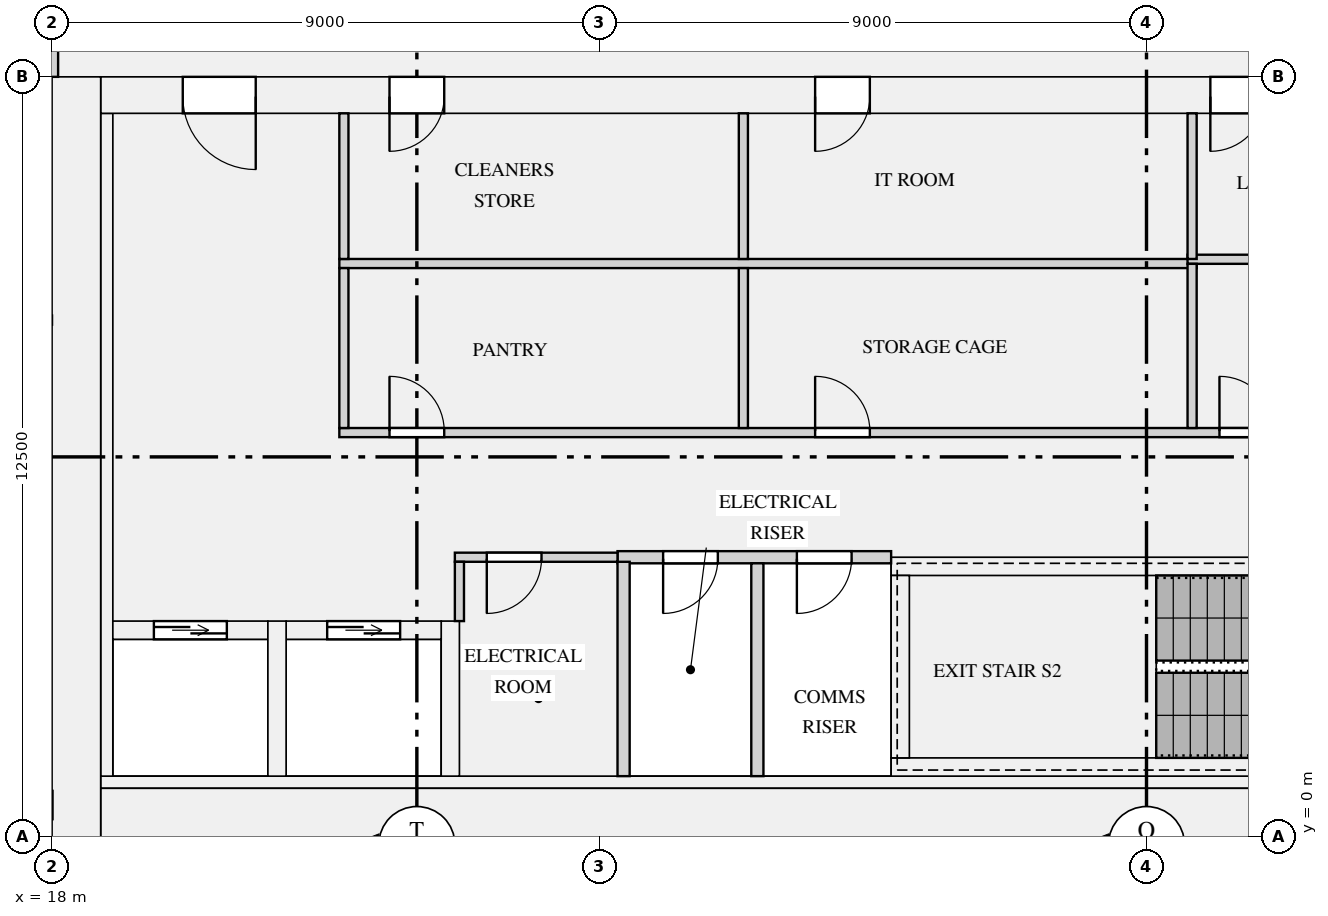
"""IFC4 building model, lengths in metres.
Left out: names, types, materials, properties, quantities, classifications, styles, units other than length and angle.
Written with IfcOpenShell. Run it as: python <this file> out.ifc"""

import sys

from ifc_helpers import new_model, si_unit, direction, frame, frame_2d, origin, place, context, subcontext, project, spatial, rectangle, extrude, element, fill, save


model = new_model("IFC4")
c1 = context("Model", 3, precision=1e-05, world=origin(), true_north=direction((0.0, 1.0)))
c2 = subcontext(c1, "Body", "Model", "MODEL_VIEW")
j1 = project(units=[si_unit("LENGTHUNIT", "METRE"), si_unit("PLANEANGLEUNIT", "RADIAN")], contexts=[c1])
p1 = place(None, origin())
s1 = spatial("IfcSite", under=j1, at=p1, CompositionType="ELEMENT")
p2 = place(p1, origin())
s2 = spatial("IfcBuilding", under=s1, at=p2, CompositionType="ELEMENT")
p3 = place(p2, frame((0.0, 0.0, 127.65)))
s3 = spatial("IfcBuildingStorey", under=s2, at=p3, CompositionType="ELEMENT", Elevation=127.65)
p4 = place(p3, frame((18.4, 0.0, 0.0), z_axis=(0.0, 0.0, 1.0), x_axis=(0.0, 1.0, 0.0)))
e1 = element("IfcWall", 1, at=p4, inside=s3, PredefinedType="SHEAR", context=c2, shape_type="SweptSolid", body=[
    extrude(rectangle(XDim=12.5, YDim=0.8, at=frame_2d((6.25, 0.0))), origin(), (0.0, 0.0, 1.0), 3.15),
])
p5 = place(p3, frame((18.8, 0.4, 0.0), z_axis=(0.0, 0.0, 1.0), x_axis=(1.0, 0.0, 0.0)))
e2 = element("IfcWall", 2, at=p5, inside=s3, PredefinedType="SHEAR", context=c2, shape_type="SweptSolid", body=[
    extrude(rectangle(XDim=34.4, YDim=0.8, at=frame_2d((17.2, 0.0))), origin(), (0.0, 0.0, 1.0), 3.15),
])
p6 = place(p3, frame((18.8, 12.2, 0.0), z_axis=(0.0, 0.0, 1.0), x_axis=(1.0, 0.0, 0.0)))
e3 = element("IfcWall", 3, at=p6, inside=s3, PredefinedType="SHEAR", context=c2, shape_type="SweptSolid", body=[
    extrude(rectangle(XDim=34.4, YDim=0.6, at=frame_2d((17.2, 0.0))), origin(), (0.0, 0.0, 1.0), 3.15),
])
p7 = place(p6, frame((24.375, 0.0, 0.0)))
e4 = element("IfcOpeningElement", 4, at=p7, cuts=e3, PredefinedType="OPENING", context=c2, shape_type="SweptSolid", body=[
    extrude(rectangle(XDim=1.1, YDim=2.1, at=frame_2d((0.55, 1.05))), frame((0.0, 0.31, 0.0), z_axis=(0.0, -1.0, 0.0), x_axis=(1.0, 0.0, 0.0)), (0.0, 0.0, 1.0), 0.62),
])
p8 = place(p6, frame((26.625, 0.0, 0.0)))
e5 = element("IfcOpeningElement", 5, at=p8, cuts=e3, PredefinedType="OPENING", context=c2, shape_type="SweptSolid", body=[
    extrude(rectangle(XDim=1.1, YDim=2.1, at=frame_2d((0.55, 1.05))), frame((0.0, 0.31, 0.0), z_axis=(0.0, -1.0, 0.0), x_axis=(1.0, 0.0, 0.0)), (0.0, 0.0, 1.0), 0.62),
])
p9 = place(p6, frame((28.875, 0.0, 0.0)))
e6 = element("IfcOpeningElement", 6, at=p9, cuts=e3, PredefinedType="OPENING", context=c2, shape_type="SweptSolid", body=[
    extrude(rectangle(XDim=1.1, YDim=2.1, at=frame_2d((0.55, 1.05))), frame((0.0, 0.31, 0.0), z_axis=(0.0, -1.0, 0.0), x_axis=(1.0, 0.0, 0.0)), (0.0, 0.0, 1.0), 0.62),
])
p10 = place(p6, frame((4.75, 0.0, 0.0)))
e7 = element("IfcOpeningElement", 7, at=p10, cuts=e3, PredefinedType="OPENING", context=c2, shape_type="SweptSolid", body=[
    extrude(rectangle(XDim=0.9, YDim=2.1, at=frame_2d((0.45, 1.05))), frame((0.0, 0.31, 0.0), z_axis=(0.0, -1.0, 0.0), x_axis=(1.0, 0.0, 0.0)), (0.0, 0.0, 1.0), 0.62),
])
p11 = place(p6, frame((11.75, 0.0, 0.0)))
e8 = element("IfcOpeningElement", 8, at=p11, cuts=e3, PredefinedType="OPENING", context=c2, shape_type="SweptSolid", body=[
    extrude(rectangle(XDim=0.9, YDim=2.1, at=frame_2d((0.45, 1.05))), frame((0.0, 0.31, 0.0), z_axis=(0.0, -1.0, 0.0), x_axis=(1.0, 0.0, 0.0)), (0.0, 0.0, 1.0), 0.62),
])
p12 = place(p6, frame((18.25, 0.0, 0.0)))
e9 = element("IfcOpeningElement", 9, at=p12, cuts=e3, PredefinedType="OPENING", context=c2, shape_type="SweptSolid", body=[
    extrude(rectangle(XDim=0.9, YDim=2.1, at=frame_2d((0.45, 1.05))), frame((0.0, 0.31, 0.0), z_axis=(0.0, -1.0, 0.0), x_axis=(1.0, 0.0, 0.0)), (0.0, 0.0, 1.0), 0.62),
])
p13 = place(p6, frame((1.35, 0.0, 0.0)))
e10 = element("IfcOpeningElement", 10, at=p13, cuts=e3, PredefinedType="OPENING", context=c2, shape_type="SweptSolid", body=[
    extrude(rectangle(XDim=1.2, YDim=2.1, at=frame_2d((0.6, 1.05))), frame((0.0, 0.31, 0.0), z_axis=(0.0, -1.0, 0.0), x_axis=(1.0, 0.0, 0.0)), (0.0, 0.0, 1.0), 0.62),
])
p14 = place(p6, frame((31.85, 0.0, 0.0)))
e11 = element("IfcOpeningElement", 11, at=p14, cuts=e3, PredefinedType="OPENING", context=c2, shape_type="SweptSolid", body=[
    extrude(rectangle(XDim=1.2, YDim=2.1, at=frame_2d((0.6, 1.05))), frame((0.0, 0.31, 0.0), z_axis=(0.0, -1.0, 0.0), x_axis=(1.0, 0.0, 0.0)), (0.0, 0.0, 1.0), 0.62),
])
p15 = place(p3, frame((18.9, 1.0, 0.0), z_axis=(0.0, 0.0, 1.0), x_axis=(0.0, 1.0, 0.0)))
e12 = element("IfcWall", 12, at=p15, inside=s3, PredefinedType="SHEAR", context=c2, shape_type="SweptSolid", body=[
    extrude(rectangle(XDim=10.9, YDim=0.2, at=frame_2d((5.45, 0.0))), origin(), (0.0, 0.0, 1.0), 3.15),
])
p16 = place(p3, frame((18.8, 0.9, 0.0), z_axis=(0.0, 0.0, 1.0), x_axis=(1.0, 0.0, 0.0)))
e13 = element("IfcWall", 13, at=p16, inside=s3, PredefinedType="SHEAR", context=c2, shape_type="SweptSolid", body=[
    extrude(rectangle(XDim=34.4, YDim=0.2, at=frame_2d((17.2, 0.0))), origin(), (0.0, 0.0, 1.0), 3.15),
])
p17 = place(p3, frame((19.0, 3.4, 0.0), z_axis=(0.0, 0.0, 1.0), x_axis=(1.0, 0.0, 0.0)))
e14 = element("IfcWall", 14, at=p17, inside=s3, PredefinedType="SHEAR", context=c2, shape_type="SweptSolid", body=[
    extrude(rectangle(XDim=2.55, YDim=0.3, at=frame_2d((1.275, 0.0))), origin(), (0.0, 0.0, 1.0), 3.15),
])
p18 = place(p17, frame((0.675, 0.0, 0.0)))
e15 = element("IfcOpeningElement", 15, at=p18, cuts=e14, PredefinedType="OPENING", context=c2, shape_type="SweptSolid", body=[
    extrude(rectangle(XDim=1.2, YDim=2.1, at=frame_2d((0.6, 1.05))), frame((0.0, 0.16, 0.0), z_axis=(0.0, -1.0, 0.0), x_axis=(1.0, 0.0, 0.0)), (0.0, 0.0, 1.0), 0.32),
])
p19 = place(p3, frame((21.85, 3.4, 0.0), z_axis=(0.0, 0.0, 1.0), x_axis=(1.0, 0.0, 0.0)))
e16 = element("IfcWall", 16, at=p19, inside=s3, PredefinedType="SHEAR", context=c2, shape_type="SweptSolid", body=[
    extrude(rectangle(XDim=2.55, YDim=0.3, at=frame_2d((1.275, 0.0))), origin(), (0.0, 0.0, 1.0), 3.15),
])
p20 = place(p19, frame((0.675, 0.0, 0.0)))
e17 = element("IfcOpeningElement", 17, at=p20, cuts=e16, PredefinedType="OPENING", context=c2, shape_type="SweptSolid", body=[
    extrude(rectangle(XDim=1.2, YDim=2.1, at=frame_2d((0.6, 1.05))), frame((0.0, 0.16, 0.0), z_axis=(0.0, -1.0, 0.0), x_axis=(1.0, 0.0, 0.0)), (0.0, 0.0, 1.0), 0.32),
])
for number, where, z_axis, x_axis in (
    (18, (21.7, 1.0, 0.0), (0.0, 0.0, 1.0), (0.0, 1.0, 0.0)),
    (19, (24.55, 1.0, 0.0), (0.0, 0.0, 1.0), (0.0, 1.0, 0.0)),
):
    element("IfcWall", number, at=place(p3, frame(where, z_axis=z_axis, x_axis=x_axis)), inside=s3, PredefinedType="SHEAR", context=c2, shape_type="SweptSolid", body=[
        extrude(rectangle(XDim=2.55, YDim=0.3, at=frame_2d((1.275, 0.0))), origin(), (0.0, 0.0, 1.0), 3.15),
    ])
p21 = place(p3, frame((31.8, 1.15, 0.0), z_axis=(0.0, 0.0, 1.0), x_axis=(1.0, 0.0, 0.0)))
e20 = element("IfcWall", 20, at=p21, inside=s3, PredefinedType="SHEAR", context=c2, shape_type="SweptSolid", body=[
    extrude(rectangle(XDim=8.4, YDim=0.3, at=frame_2d((4.2, 0.0))), origin(), (0.0, 0.0, 1.0), 3.15),
])
p22 = place(p3, frame((31.8, 4.45, 0.0), z_axis=(0.0, 0.0, 1.0), x_axis=(1.0, 0.0, 0.0)))
e21 = element("IfcWall", 21, at=p22, inside=s3, PredefinedType="SHEAR", context=c2, shape_type="SweptSolid", body=[
    extrude(rectangle(XDim=8.4, YDim=0.3, at=frame_2d((4.2, 0.0))), origin(), (0.0, 0.0, 1.0), 3.15),
])
p23 = place(p22, frame((6.8, 0.0, 0.0)))
e22 = element("IfcOpeningElement", 22, at=p23, cuts=e21, PredefinedType="OPENING", context=c2, shape_type="SweptSolid", body=[
    extrude(rectangle(XDim=1.1, YDim=2.1, at=frame_2d((0.55, 1.05))), frame((0.0, 0.16, 0.0), z_axis=(0.0, -1.0, 0.0), x_axis=(1.0, 0.0, 0.0)), (0.0, 0.0, 1.0), 0.32),
])
p24 = place(p3, frame((31.95, 1.3, 0.0), z_axis=(0.0, 0.0, 1.0), x_axis=(0.0, 1.0, 0.0)))
e23 = element("IfcWall", 23, at=p24, inside=s3, PredefinedType="SHEAR", context=c2, shape_type="SweptSolid", body=[
    extrude(rectangle(XDim=3.0, YDim=0.3, at=frame_2d((1.5, 0.0))), origin(), (0.0, 0.0, 1.0), 3.15),
])
p25 = place(p3, frame((14.05, 0.525, 0.9), z_axis=(0.0, 0.0, 1.0), x_axis=(1.0, 0.0, 0.0)))
e24 = element("IfcWall", 24, at=p25, inside=s3, PredefinedType="SOLIDWALL", context=c2, shape_type="SweptSolid", body=[
    extrude(rectangle(XDim=3.95, YDim=0.45, at=frame_2d((1.975, 0.0))), origin(), (0.0, 0.0, 1.0), 1.75),
])
p26 = place(p25, frame((1.225, 0.0, 0.15)))
e25 = element("IfcOpeningElement", 25, at=p26, cuts=e24, PredefinedType="OPENING", context=c2, shape_type="SweptSolid", body=[
    extrude(rectangle(XDim=1.5, YDim=1.5, at=frame_2d((0.75, 0.75))), frame((0.0, 0.235, 0.0), z_axis=(0.0, -1.0, 0.0), x_axis=(1.0, 0.0, 0.0)), (0.0, 0.0, 1.0), 0.47),
])
p27 = place(p3, frame((27.3, 4.6, 0.0), z_axis=(0.0, 0.0, 1.0), x_axis=(1.0, 0.0, 0.0)))
e26 = element("IfcWall", 26, at=p27, inside=s3, PredefinedType="PARTITIONING", context=c2, shape_type="SweptSolid", body=[
    extrude(rectangle(XDim=4.5, YDim=0.2, at=frame_2d((2.25, 0.0))), origin(), (0.0, 0.0, 1.0), 2.65),
])
p28 = place(p27, frame((0.75, 0.0, 0.0)))
e27 = element("IfcOpeningElement", 27, at=p28, cuts=e26, PredefinedType="OPENING", context=c2, shape_type="SweptSolid", body=[
    extrude(rectangle(XDim=0.9, YDim=2.1, at=frame_2d((0.45, 1.05))), frame((0.0, 0.11, 0.0), z_axis=(0.0, -1.0, 0.0), x_axis=(1.0, 0.0, 0.0)), (0.0, 0.0, 1.0), 0.22),
])
p29 = place(p27, frame((2.95, 0.0, 0.0)))
e28 = element("IfcOpeningElement", 28, at=p29, cuts=e26, PredefinedType="OPENING", context=c2, shape_type="SweptSolid", body=[
    extrude(rectangle(XDim=0.9, YDim=2.1, at=frame_2d((0.45, 1.05))), frame((0.0, 0.11, 0.0), z_axis=(0.0, -1.0, 0.0), x_axis=(1.0, 0.0, 0.0)), (0.0, 0.0, 1.0), 0.22),
])
p30 = place(p3, frame((24.625, 4.6, 0.0), z_axis=(0.0, 0.0, 1.0), x_axis=(1.0, 0.0, 0.0)))
e29 = element("IfcWall", 29, at=p30, inside=s3, PredefinedType="PARTITIONING", context=c2, shape_type="SweptSolid", body=[
    extrude(rectangle(XDim=2.675, YDim=0.15, at=frame_2d((1.337, 0.0))), origin(), (0.0, 0.0, 1.0), 2.65),
])
p31 = place(p30, frame((0.525, 0.0, 0.0)))
e30 = element("IfcOpeningElement", 30, at=p31, cuts=e29, PredefinedType="OPENING", context=c2, shape_type="SweptSolid", body=[
    extrude(rectangle(XDim=0.9, YDim=2.1, at=frame_2d((0.45, 1.05))), frame((0.0, 0.085, 0.0), z_axis=(0.0, -1.0, 0.0), x_axis=(1.0, 0.0, 0.0)), (0.0, 0.0, 1.0), 0.17),
])
p32 = place(p3, frame((22.725, 6.65, 0.0), z_axis=(0.0, 0.0, 1.0), x_axis=(1.0, 0.0, 0.0)))
e31 = element("IfcWall", 31, at=p32, inside=s3, PredefinedType="PARTITIONING", context=c2, shape_type="SweptSolid", body=[
    extrude(rectangle(XDim=19.8, YDim=0.15, at=frame_2d((9.9, 0.0))), origin(), (0.0, 0.0, 1.0), 2.65),
])
p33 = place(p32, frame((0.825, 0.0, 0.0)))
e32 = element("IfcOpeningElement", 32, at=p33, cuts=e31, PredefinedType="OPENING", context=c2, shape_type="SweptSolid", body=[
    extrude(rectangle(XDim=0.9, YDim=2.1, at=frame_2d((0.45, 1.05))), frame((0.0, 0.085, 0.0), z_axis=(0.0, -1.0, 0.0), x_axis=(1.0, 0.0, 0.0)), (0.0, 0.0, 1.0), 0.17),
])
p34 = place(p32, frame((7.825, 0.0, 0.0)))
e33 = element("IfcOpeningElement", 33, at=p34, cuts=e31, PredefinedType="OPENING", context=c2, shape_type="SweptSolid", body=[
    extrude(rectangle(XDim=0.9, YDim=2.1, at=frame_2d((0.45, 1.05))), frame((0.0, 0.085, 0.0), z_axis=(0.0, -1.0, 0.0), x_axis=(1.0, 0.0, 0.0)), (0.0, 0.0, 1.0), 0.17),
])
p35 = place(p32, frame((14.475, 0.0, 0.0)))
e34 = element("IfcOpeningElement", 34, at=p35, cuts=e31, PredefinedType="OPENING", context=c2, shape_type="SweptSolid", body=[
    extrude(rectangle(XDim=0.9, YDim=2.1, at=frame_2d((0.45, 1.05))), frame((0.0, 0.085, 0.0), z_axis=(0.0, -1.0, 0.0), x_axis=(1.0, 0.0, 0.0)), (0.0, 0.0, 1.0), 0.17),
])
p36 = place(p3, frame((22.725, 9.43, 0.0), z_axis=(0.0, 0.0, 1.0), x_axis=(1.0, 0.0, 0.0)))
e35 = element("IfcWall", 35, at=p36, inside=s3, PredefinedType="PARTITIONING", context=c2, shape_type="SweptSolid", body=[
    extrude(rectangle(XDim=14.1, YDim=0.15, at=frame_2d((7.05, 0.0))), origin(), (0.0, 0.0, 1.0), 2.65),
])
p37 = place(p3, frame((36.675, 9.5, 0.0), z_axis=(0.0, 0.0, 1.0), x_axis=(1.0, 0.0, 0.0)))
e36 = element("IfcWall", 36, at=p37, inside=s3, PredefinedType="PARTITIONING", context=c2, shape_type="SweptSolid", body=[
    extrude(rectangle(XDim=5.775, YDim=0.15, at=frame_2d((2.887, 0.0))), origin(), (0.0, 0.0, 1.0), 2.65),
])
p38 = place(p3, frame((27.4, 1.0, 0.0), z_axis=(0.0, 0.0, 1.0), x_axis=(0.0, 1.0, 0.0)))
e37 = element("IfcWall", 37, at=p38, inside=s3, PredefinedType="PARTITIONING", context=c2, shape_type="SweptSolid", body=[
    extrude(rectangle(XDim=3.525, YDim=0.2, at=frame_2d((1.762, 0.0))), origin(), (0.0, 0.0, 1.0), 2.65),
])
p39 = place(p3, frame((29.6, 1.0, 0.0), z_axis=(0.0, 0.0, 1.0), x_axis=(0.0, 1.0, 0.0)))
e38 = element("IfcWall", 38, at=p39, inside=s3, PredefinedType="PARTITIONING", context=c2, shape_type="SweptSolid", body=[
    extrude(rectangle(XDim=3.5, YDim=0.2, at=frame_2d((1.75, 0.0))), origin(), (0.0, 0.0, 1.0), 2.65),
])
p40 = place(p3, frame((24.7, 3.55, 0.0), z_axis=(0.0, 0.0, 1.0), x_axis=(0.0, 1.0, 0.0)))
e39 = element("IfcWall", 39, at=p40, inside=s3, PredefinedType="PARTITIONING", context=c2, shape_type="SweptSolid", body=[
    extrude(rectangle(XDim=0.975, YDim=0.15, at=frame_2d((0.487, 0.0))), origin(), (0.0, 0.0, 1.0), 2.65),
])
for number, where, z_axis, x_axis in (
    (40, (22.8, 6.725, 0.0), (0.0, 0.0, 1.0), (0.0, 1.0, 0.0)),
    (41, (29.37, 6.725, 0.0), (0.0, 0.0, 1.0), (0.0, 1.0, 0.0)),
):
    element("IfcWall", number, at=place(p3, frame(where, z_axis=z_axis, x_axis=x_axis)), inside=s3, PredefinedType="PARTITIONING", context=c2, shape_type="SweptSolid", body=[
        extrude(rectangle(XDim=2.63, YDim=0.15, at=frame_2d((1.315, 0.0))), origin(), (0.0, 0.0, 1.0), 2.65),
    ])
p41 = place(p3, frame((36.75, 6.725, 0.0), z_axis=(0.0, 0.0, 1.0), x_axis=(0.0, 1.0, 0.0)))
e42 = element("IfcWall", 42, at=p41, inside=s3, PredefinedType="PARTITIONING", context=c2, shape_type="SweptSolid", body=[
    extrude(rectangle(XDim=2.7, YDim=0.15, at=frame_2d((1.35, 0.0))), origin(), (0.0, 0.0, 1.0), 2.65),
])
for number, where, z_axis, x_axis in (
    (43, (22.8, 9.505, 0.0), (0.0, 0.0, 1.0), (0.0, 1.0, 0.0)),
    (44, (29.37, 9.505, 0.0), (0.0, 0.0, 1.0), (0.0, 1.0, 0.0)),
    (45, (36.75, 9.505, 0.0), (0.0, 0.0, 1.0), (0.0, 1.0, 0.0)),
):
    element("IfcWall", number, at=place(p3, frame(where, z_axis=z_axis, x_axis=x_axis)), inside=s3, PredefinedType="PARTITIONING", context=c2, shape_type="SweptSolid", body=[
        extrude(rectangle(XDim=2.395, YDim=0.15, at=frame_2d((1.198, 0.0))), origin(), (0.0, 0.0, 1.0), 2.65),
    ])
p42 = place(p3, frame((18.0, 12.5, 0.0), z_axis=(0.0, 0.0, 1.0), x_axis=(0.0, 1.0, 0.0)))
e46 = element("IfcWall", 46, at=p42, inside=s3, PredefinedType="PARTITIONING", context=c2, shape_type="SweptSolid", body=[
    extrude(rectangle(XDim=3.4, YDim=0.2, at=frame_2d((1.7, 0.0))), origin(), (0.0, 0.0, 1.0), 2.65),
])
p43 = place(p18, origin())
e47 = element("IfcDoor", 47, at=p43, inside=s3, OperationType="DOUBLE_DOOR_SLIDING", PredefinedType="DOOR", context=c2, shape_type="SweptSolid", body=[
    extrude(rectangle(XDim=1.2, YDim=2.1, at=frame_2d((0.6, 1.05))), frame((0.0, 0.025, 0.0), z_axis=(0.0, -1.0, 0.0), x_axis=(1.0, 0.0, 0.0)), (0.0, 0.0, 1.0), 0.05),
])
fill(e15, e47)
p44 = place(p20, origin())
e48 = element("IfcDoor", 48, at=p44, inside=s3, OperationType="DOUBLE_DOOR_SLIDING", PredefinedType="DOOR", context=c2, shape_type="SweptSolid", body=[
    extrude(rectangle(XDim=1.2, YDim=2.1, at=frame_2d((0.6, 1.05))), frame((0.0, 0.025, 0.0), z_axis=(0.0, -1.0, 0.0), x_axis=(1.0, 0.0, 0.0)), (0.0, 0.0, 1.0), 0.05),
])
fill(e17, e48)
p45 = place(p31, frame((0.9, 0.0, 0.0), z_axis=(0.0, 0.0, 1.0), x_axis=(-1.0, 0.0, 0.0)))
e49 = element("IfcDoor", 49, at=p45, inside=s3, OperationType="SINGLE_SWING_RIGHT", PredefinedType="DOOR", context=c2, shape_type="SweptSolid", body=[
    extrude(rectangle(XDim=0.9, YDim=2.1, at=frame_2d((0.45, 1.05))), frame((0.0, 0.025, 0.0), z_axis=(0.0, -1.0, 0.0), x_axis=(1.0, 0.0, 0.0)), (0.0, 0.0, 1.0), 0.05),
])
fill(e30, e49)
p46 = place(p33, origin())
e50 = element("IfcDoor", 50, at=p46, inside=s3, OperationType="SINGLE_SWING_LEFT", PredefinedType="DOOR", context=c2, shape_type="SweptSolid", body=[
    extrude(rectangle(XDim=0.9, YDim=2.1, at=frame_2d((0.45, 1.05))), frame((0.0, 0.025, 0.0), z_axis=(0.0, -1.0, 0.0), x_axis=(1.0, 0.0, 0.0)), (0.0, 0.0, 1.0), 0.05),
])
fill(e32, e50)
p47 = place(p34, origin())
e51 = element("IfcDoor", 51, at=p47, inside=s3, OperationType="SINGLE_SWING_LEFT", PredefinedType="DOOR", context=c2, shape_type="SweptSolid", body=[
    extrude(rectangle(XDim=0.9, YDim=2.1, at=frame_2d((0.45, 1.05))), frame((0.0, 0.025, 0.0), z_axis=(0.0, -1.0, 0.0), x_axis=(1.0, 0.0, 0.0)), (0.0, 0.0, 1.0), 0.05),
])
fill(e33, e51)
p48 = place(p10, frame((0.9, 0.0, 0.0), z_axis=(0.0, 0.0, 1.0), x_axis=(-1.0, 0.0, 0.0)))
e52 = element("IfcDoor", 52, at=p48, inside=s3, OperationType="SINGLE_SWING_RIGHT", PredefinedType="DOOR", context=c2, shape_type="SweptSolid", body=[
    extrude(rectangle(XDim=0.9, YDim=2.1, at=frame_2d((0.45, 1.05))), frame((0.0, 0.025, 0.0), z_axis=(0.0, -1.0, 0.0), x_axis=(1.0, 0.0, 0.0)), (0.0, 0.0, 1.0), 0.05),
])
fill(e7, e52)
p49 = place(p11, frame((0.9, 0.0, 0.0), z_axis=(0.0, 0.0, 1.0), x_axis=(-1.0, 0.0, 0.0)))
e53 = element("IfcDoor", 53, at=p49, inside=s3, OperationType="SINGLE_SWING_RIGHT", PredefinedType="DOOR", context=c2, shape_type="SweptSolid", body=[
    extrude(rectangle(XDim=0.9, YDim=2.1, at=frame_2d((0.45, 1.05))), frame((0.0, 0.025, 0.0), z_axis=(0.0, -1.0, 0.0), x_axis=(1.0, 0.0, 0.0)), (0.0, 0.0, 1.0), 0.05),
])
fill(e8, e53)
p50 = place(p35, origin())
e54 = element("IfcDoor", 54, at=p50, inside=s3, OperationType="SINGLE_SWING_LEFT", PredefinedType="DOOR", context=c2, shape_type="SweptSolid", body=[
    extrude(rectangle(XDim=0.9, YDim=2.1, at=frame_2d((0.45, 1.05))), frame((0.0, 0.025, 0.0), z_axis=(0.0, -1.0, 0.0), x_axis=(1.0, 0.0, 0.0)), (0.0, 0.0, 1.0), 0.05),
])
fill(e34, e54)
p51 = place(p12, frame((0.9, 0.0, 0.0), z_axis=(0.0, 0.0, 1.0), x_axis=(-1.0, 0.0, 0.0)))
e55 = element("IfcDoor", 55, at=p51, inside=s3, OperationType="SINGLE_SWING_RIGHT", PredefinedType="DOOR", context=c2, shape_type="SweptSolid", body=[
    extrude(rectangle(XDim=0.9, YDim=2.1, at=frame_2d((0.45, 1.05))), frame((0.0, 0.025, 0.0), z_axis=(0.0, -1.0, 0.0), x_axis=(1.0, 0.0, 0.0)), (0.0, 0.0, 1.0), 0.05),
])
fill(e9, e55)
p52 = place(p28, frame((0.9, 0.0, 0.0), z_axis=(0.0, 0.0, 1.0), x_axis=(-1.0, 0.0, 0.0)))
e56 = element("IfcDoor", 56, at=p52, inside=s3, OperationType="SINGLE_SWING_RIGHT", PredefinedType="DOOR", context=c2, shape_type="SweptSolid", body=[
    extrude(rectangle(XDim=0.9, YDim=2.1, at=frame_2d((0.45, 1.05))), frame((0.0, 0.025, 0.0), z_axis=(0.0, -1.0, 0.0), x_axis=(1.0, 0.0, 0.0)), (0.0, 0.0, 1.0), 0.05),
])
fill(e27, e56)
p53 = place(p29, frame((0.9, 0.0, 0.0), z_axis=(0.0, 0.0, 1.0), x_axis=(-1.0, 0.0, 0.0)))
e57 = element("IfcDoor", 57, at=p53, inside=s3, OperationType="SINGLE_SWING_RIGHT", PredefinedType="DOOR", context=c2, shape_type="SweptSolid", body=[
    extrude(rectangle(XDim=0.9, YDim=2.1, at=frame_2d((0.45, 1.05))), frame((0.0, 0.025, 0.0), z_axis=(0.0, -1.0, 0.0), x_axis=(1.0, 0.0, 0.0)), (0.0, 0.0, 1.0), 0.05),
])
fill(e28, e57)
p54 = place(p13, frame((1.2, 0.0, 0.0), z_axis=(0.0, 0.0, 1.0), x_axis=(-1.0, 0.0, 0.0)))
e58 = element("IfcDoor", 58, at=p54, inside=s3, OperationType="SINGLE_SWING_LEFT", PredefinedType="DOOR", context=c2, shape_type="SweptSolid", body=[
    extrude(rectangle(XDim=1.2, YDim=2.1, at=frame_2d((0.6, 1.05))), frame((0.0, 0.025, 0.0), z_axis=(0.0, -1.0, 0.0), x_axis=(1.0, 0.0, 0.0)), (0.0, 0.0, 1.0), 0.05),
])
fill(e10, e58)
save(model, sys.argv[1])
